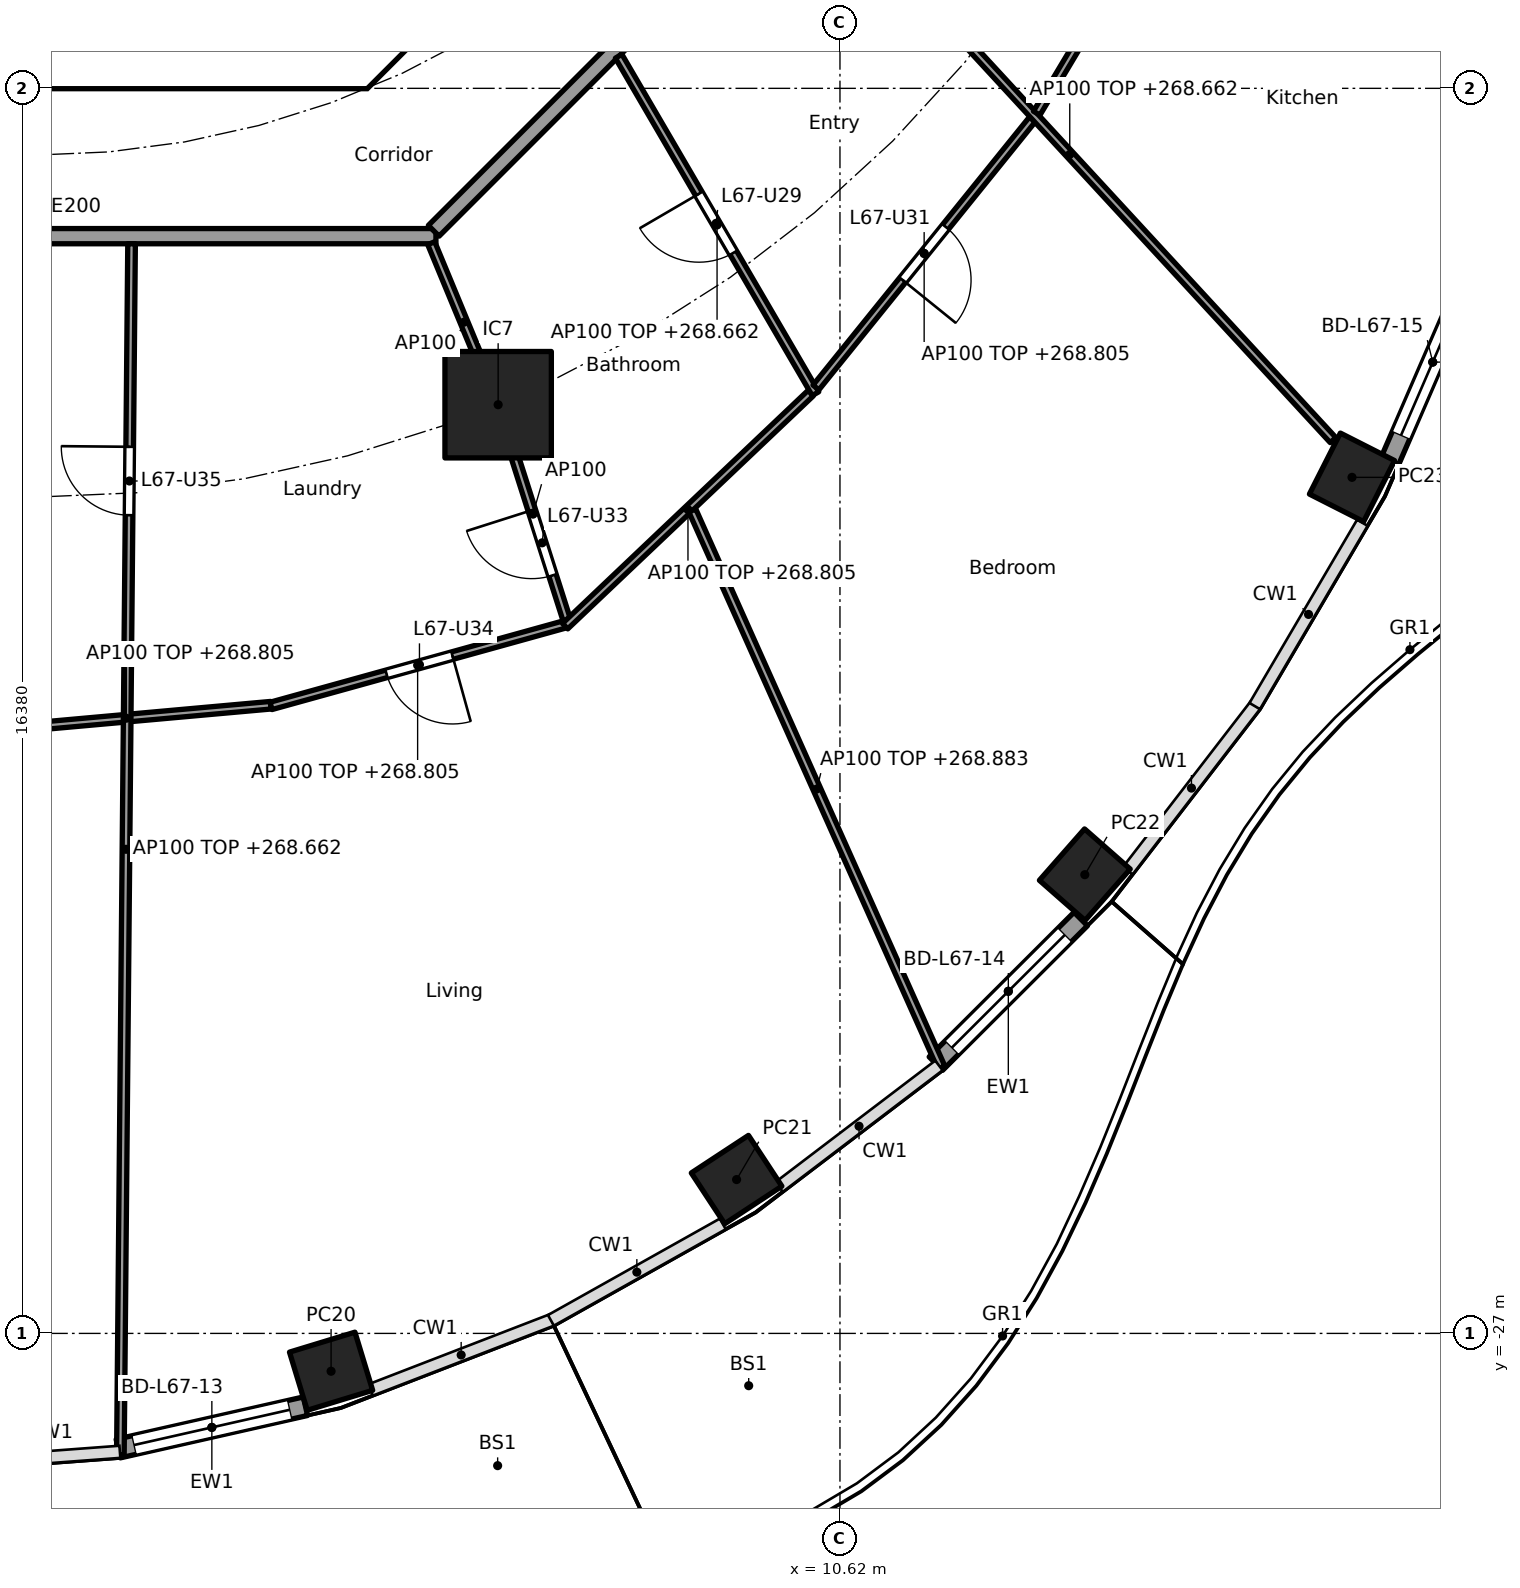
"""IFC4 building model, lengths in metres.
Left out: names, types, materials, properties, quantities, classifications, styles, units other than length and angle.
Written with IfcOpenShell. Run it as: python <this file> out.ifc"""

import sys

from ifc_helpers import new_model, si_unit, direction, frame, frame_2d, origin, origin_2d, place, context, subcontext, project, spatial, polyline, rectangle, hollow_rectangle, outline, extrude, element, fill, save


model = new_model("IFC4")
c1 = context("Model", 3, precision=1e-05, world=origin(), true_north=direction((0.0, 1.0)))
c2 = subcontext(c1, "Body", "Model", "MODEL_VIEW")
j1 = project(units=[si_unit("LENGTHUNIT", "METRE"), si_unit("PLANEANGLEUNIT", "RADIAN")], contexts=[c1])
p1 = place(None, origin())
s1 = spatial("IfcSite", under=j1, at=p1, CompositionType="ELEMENT")
p2 = place(p1, origin())
s2 = spatial("IfcBuilding", under=s1, at=p2, CompositionType="ELEMENT")
p3 = place(p2, frame((0.0, 0.0, 265.9)))
s3 = spatial("IfcBuildingStorey", under=s2, at=p3, CompositionType="ELEMENT", Elevation=265.9)
for number, where, z_axis, x_axis in (
    (1, (3.925, -27.498, 0.0), (0.0, 0.0, 1.0), (0.957, 0.292, 0.0)),
    (2, (9.26, -24.976, 0.0), (0.0, 0.0, 1.0), (0.836, 0.549, 0.0)),
    (3, (13.841, -20.965, 0.0), (0.0, 0.0, 1.0), (0.66, 0.751, 0.0)),
    (4, (17.356, -15.738, 0.0), (0.0, 0.0, 1.0), (0.452, 0.892, 0.0)),
):
    element("IfcColumn", number, at=place(p3, frame(where, z_axis=z_axis, x_axis=x_axis)), inside=s3, PredefinedType="COLUMN", context=c2, shape_type="SweptSolid", body=[
        extrude(hollow_rectangle(XDim=0.9, YDim=0.8, WallThickness=0.028, at=origin_2d()), origin(), (0.0, 0.0, 1.0), 3.7),
    ])
p4 = place(p3, frame((6.123, -14.782, 0.0), z_axis=(0.0, 0.0, 1.0), x_axis=(1.0, 0.0, 0.0)))
e5 = element("IfcColumn", 5, at=p4, inside=s3, PredefinedType="COLUMN", context=c2, shape_type="SweptSolid", body=[
    extrude(rectangle(XDim=1.4, YDim=1.4, at=origin_2d()), origin(), (0.0, 0.0, 1.0), 3.7),
])
p5 = place(p3, frame((3.588, -27.958, 0.0), z_axis=(0.0, 0.0, 1.0), x_axis=(-0.97531487046, -0.22081871175, 0.0)))
e6 = element("IfcWall", 6, at=p5, inside=s3, PredefinedType="SOLIDWALL", context=c2, shape_type="SweptSolid", body=[
    extrude(rectangle(XDim=2.525, YDim=0.25, at=frame_2d((1.263, 0.0))), origin(), (0.0, 0.0, 1.0), 3.44),
])
p6 = place(p5, frame((0.213, 0.0, 0.0)))
e7 = element("IfcOpeningElement", 7, at=p6, cuts=e6, PredefinedType="OPENING", context=c2, shape_type="SweptSolid", body=[
    extrude(rectangle(XDim=2.1, YDim=2.4, at=frame_2d((1.05, 1.2))), frame((0.0, 0.135, 0.0), z_axis=(0.0, -1.0, 0.0), x_axis=(1.0, 0.0, 0.0)), (0.0, 0.0, 1.0), 0.27),
])
p7 = place(p3, frame((13.788, -21.548, 0.0), z_axis=(0.0, 0.0, 1.0), x_axis=(-0.707831739508, -0.706381078841, 0.0)))
e8 = element("IfcWall", 8, at=p7, inside=s3, PredefinedType="SOLIDWALL", context=c2, shape_type="SweptSolid", body=[
    extrude(rectangle(XDim=2.693, YDim=0.25, at=frame_2d((1.346, 0.0))), origin(), (0.0, 0.0, 1.0), 3.44),
])
p8 = place(p7, frame((0.296, 0.0, 0.0)))
e9 = element("IfcOpeningElement", 9, at=p8, cuts=e8, PredefinedType="OPENING", context=c2, shape_type="SweptSolid", body=[
    extrude(rectangle(XDim=2.1, YDim=2.4, at=frame_2d((1.05, 1.2))), frame((0.0, 0.135, 0.0), z_axis=(0.0, -1.0, 0.0), x_axis=(1.0, 0.0, 0.0)), (0.0, 0.0, 1.0), 0.27),
])
p9 = place(p3, frame((18.983, -12.918, 0.0), z_axis=(0.0, 0.0, 1.0), x_axis=(-0.397597791596, -0.9175598052, 0.0)))
e10 = element("IfcWall", 10, at=p9, inside=s3, PredefinedType="SOLIDWALL", context=c2, shape_type="SweptSolid", body=[
    extrude(rectangle(XDim=2.841, YDim=0.25, at=frame_2d((1.42, 0.0))), origin(), (0.0, 0.0, 1.0), 3.44),
])
p10 = place(p9, frame((0.371, 0.0, 0.0)))
e11 = element("IfcOpeningElement", 11, at=p10, cuts=e10, PredefinedType="OPENING", context=c2, shape_type="SweptSolid", body=[
    extrude(rectangle(XDim=2.1, YDim=2.4, at=frame_2d((1.05, 1.2))), frame((0.0, 0.135, 0.0), z_axis=(0.0, -1.0, 0.0), x_axis=(1.0, 0.0, 0.0)), (0.0, 0.0, 1.0), 0.27),
])
p11 = place(p3, frame((4.613, -9.988, 0.0), z_axis=(0.0, 0.0, 1.0), x_axis=(0.707106781187, 0.707106781187, 0.0)))
e12 = element("IfcWall", 12, at=p11, inside=s3, PredefinedType="SHEAR", context=c2, shape_type="SweptSolid", body=[
    extrude(rectangle(XDim=7.602, YDim=0.6, at=frame_2d((3.801, 0.0))), origin(), (0.0, 0.0, 1.0), 3.44),
])
p12 = place(p11, frame((3.201, 0.0, 0.0)))
e13 = element("IfcOpeningElement", 13, at=p12, cuts=e12, PredefinedType="OPENING", context=c2, shape_type="SweptSolid", body=[
    extrude(rectangle(XDim=1.2, YDim=2.1, at=frame_2d((0.6, 1.05))), frame((0.0, 0.31, 0.0), z_axis=(0.0, -1.0, 0.0), x_axis=(1.0, 0.0, 0.0)), (0.0, 0.0, 1.0), 0.62),
])
p13 = place(p3, origin())
e14 = element("IfcWall", 14, at=p13, inside=s3, PredefinedType="SHEAR", context=c2, shape_type="SweptSolid", body=[
    extrude(outline(polyline([(-4.152, -10.025), (4.152, -10.025), (4.401, -9.776), (4.825, -10.2), (4.401, -10.625), (-4.401, -10.625), (-4.825, -10.2), (-4.401, -9.776), (-4.152, -10.025)])), origin(), (0.0, 0.0, 1.0), 3.44),
])
p14 = place(p3, frame((-5.104, -12.565, 0.0), z_axis=(0.0, 0.0, 1.0), x_axis=(1.0, 0.0, 0.0)))
e15 = element("IfcWall", 15, at=p14, inside=s3, PredefinedType="PARTITIONING", context=c2, shape_type="SweptSolid", body=[
    extrude(rectangle(XDim=10.409, YDim=0.2, at=frame_2d((5.205, 0.0))), origin(), (0.0, 0.0, 1.0), 3.44),
])
p15 = place(p3, frame((5.275, -12.494, 0.0), z_axis=(0.0, 0.0, 1.0), x_axis=(0.707106781187, 0.707106781187, 0.0)))
e16 = element("IfcWall", 16, at=p15, inside=s3, PredefinedType="PARTITIONING", context=c2, shape_type="SweptSolid", body=[
    extrude(rectangle(XDim=10.409, YDim=0.2, at=frame_2d((5.205, 0.0))), origin(), (0.0, 0.0, 1.0), 3.44),
])
p16 = place(p15, frame((4.604, 0.0, 0.0)))
e17 = element("IfcOpeningElement", 17, at=p16, cuts=e16, PredefinedType="OPENING", context=c2, shape_type="SweptSolid", body=[
    extrude(rectangle(XDim=1.0, YDim=2.1, at=frame_2d((0.5, 1.05))), frame((0.0, 0.11, 0.0), z_axis=(0.0, -1.0, 0.0), x_axis=(1.0, 0.0, 0.0)), (0.0, 0.0, 1.0), 0.22),
])
p17 = place(p3, frame((-0.67, -19.077, 0.0), z_axis=(0.0, 0.0, 1.0), x_axis=(0.995986472869, 0.089503887414, 0.0)))
e18 = element("IfcWall", 18, at=p17, inside=s3, PredefinedType="PARTITIONING", context=c2, shape_type="SweptSolid", body=[
    extrude(rectangle(XDim=3.819, YDim=0.1, at=frame_2d((1.909, 0.0))), origin(), (0.0, 0.0, 1.0), 2.905),
])
p18 = place(p3, frame((1.3, -12.665, 0.0), z_axis=(0.0, 0.0, 1.0), x_axis=(-0.009254890166, -0.999957172587, 0.0)))
e19 = element("IfcWall", 19, at=p18, inside=s3, PredefinedType="PARTITIONING", context=c2, shape_type="SweptSolid", body=[
    extrude(rectangle(XDim=15.933, YDim=0.1, at=frame_2d((7.967, 0.0))), origin(), (0.0, 0.0, 1.0), 2.762),
])
p19 = place(p18, frame((2.671, 0.0, 0.0)))
e20 = element("IfcOpeningElement", 20, at=p19, cuts=e19, PredefinedType="OPENING", context=c2, shape_type="SweptSolid", body=[
    extrude(rectangle(XDim=0.9, YDim=2.1, at=frame_2d((0.45, 1.05))), frame((0.0, 0.06, 0.0), z_axis=(0.0, -1.0, 0.0), x_axis=(1.0, 0.0, 0.0)), (0.0, 0.0, 1.0), 0.12),
])
p20 = place(p3, frame((3.135, -18.744, 0.0), z_axis=(0.0, 0.0, 1.0), x_axis=(0.963606111552, 0.267326133738, 0.0)))
e21 = element("IfcWall", 21, at=p20, inside=s3, PredefinedType="PARTITIONING", context=c2, shape_type="SweptSolid", body=[
    extrude(rectangle(XDim=4.003, YDim=0.1, at=frame_2d((2.001, 0.0))), origin(), (0.0, 0.0, 1.0), 2.905),
])
p21 = place(p20, frame((1.576, 0.0, 0.0)))
e22 = element("IfcOpeningElement", 22, at=p21, cuts=e21, PredefinedType="OPENING", context=c2, shape_type="SweptSolid", body=[
    extrude(rectangle(XDim=0.9, YDim=2.1, at=frame_2d((0.45, 1.05))), frame((0.0, 0.06, 0.0), z_axis=(0.0, -1.0, 0.0), x_axis=(1.0, 0.0, 0.0)), (0.0, 0.0, 1.0), 0.12),
])
p22 = place(p3, frame((5.243, -12.657, 0.0), z_axis=(0.0, 0.0, 1.0), x_axis=(0.382719158442, -0.923864733477, 0.0)))
e23 = element("IfcWall", 23, at=p22, inside=s3, PredefinedType="PARTITIONING", context=c2, shape_type="SweptSolid", body=[
    extrude(rectangle(XDim=2.25, YDim=0.1, at=frame_2d((1.125, 0.0))), origin(), (0.0, 0.0, 1.0), 3.44),
])
p23 = place(p3, frame((6.138, -14.83, 0.0), z_axis=(0.0, 0.0, 1.0), x_axis=(0.303665801704, -0.952778610631, 0.0)))
e24 = element("IfcWall", 24, at=p23, inside=s3, PredefinedType="PARTITIONING", context=c2, shape_type="SweptSolid", body=[
    extrude(rectangle(XDim=2.922, YDim=0.1, at=frame_2d((1.461, 0.0))), origin(), (0.0, 0.0, 1.0), 3.44),
])
p24 = place(p23, frame((1.407, 0.0, 0.0)))
e25 = element("IfcOpeningElement", 25, at=p24, cuts=e24, PredefinedType="OPENING", context=c2, shape_type="SweptSolid", body=[
    extrude(rectangle(XDim=0.9, YDim=2.1, at=frame_2d((0.45, 1.05))), frame((0.0, 0.06, 0.0), z_axis=(0.0, -1.0, 0.0), x_axis=(1.0, 0.0, 0.0)), (0.0, 0.0, 1.0), 0.12),
])
p25 = place(p3, frame((7.004, -17.695, 0.0), z_axis=(0.0, 0.0, 1.0), x_axis=(0.725438442765, 0.68828705186, 0.0)))
e26 = element("IfcWall", 26, at=p25, inside=s3, PredefinedType="PARTITIONING", context=c2, shape_type="SweptSolid", body=[
    extrude(rectangle(XDim=4.456, YDim=0.1, at=frame_2d((2.228, 0.0))), origin(), (0.0, 0.0, 1.0), 2.905),
])
p26 = place(p3, frame((8.677, -16.173, 0.0), z_axis=(0.0, 0.0, 1.0), x_axis=(0.408174671437, -0.912903849043, 0.0)))
e27 = element("IfcWall", 27, at=p26, inside=s3, PredefinedType="PARTITIONING", context=c2, shape_type="SweptSolid", body=[
    extrude(rectangle(XDim=8.028, YDim=0.1, at=frame_2d((4.014, 0.0))), origin(), (0.0, 0.0, 1.0), 2.983),
])
p27 = place(p3, frame((7.708, -10.198, 0.0), z_axis=(0.0, 0.0, 1.0), x_axis=(0.503838537732, -0.863797851292, 0.0)))
e28 = element("IfcWall", 28, at=p27, inside=s3, PredefinedType="PARTITIONING", context=c2, shape_type="SweptSolid", body=[
    extrude(rectangle(XDim=5.14, YDim=0.1, at=frame_2d((2.57, 0.0))), origin(), (0.0, 0.0, 1.0), 2.762),
])
p28 = place(p27, frame((2.095, 0.0, 0.0)))
e29 = element("IfcOpeningElement", 29, at=p28, cuts=e28, PredefinedType="OPENING", context=c2, shape_type="SweptSolid", body=[
    extrude(rectangle(XDim=0.9, YDim=2.1, at=frame_2d((0.45, 1.05))), frame((0.0, 0.06, 0.0), z_axis=(0.0, -1.0, 0.0), x_axis=(1.0, 0.0, 0.0)), (0.0, 0.0, 1.0), 0.12),
])
p29 = place(p3, frame((10.304, -14.555, 0.0), z_axis=(0.0, 0.0, 1.0), x_axis=(0.628170338674, 0.778075848237, 0.0)))
e30 = element("IfcWall", 30, at=p29, inside=s3, PredefinedType="PARTITIONING", context=c2, shape_type="SweptSolid", body=[
    extrude(rectangle(XDim=4.532, YDim=0.1, at=frame_2d((2.266, 0.0))), origin(), (0.0, 0.0, 1.0), 2.905),
])
p30 = place(p29, frame((1.816, 0.0, 0.0)))
e31 = element("IfcOpeningElement", 31, at=p30, cuts=e30, PredefinedType="OPENING", context=c2, shape_type="SweptSolid", body=[
    extrude(rectangle(XDim=0.9, YDim=2.1, at=frame_2d((0.45, 1.05))), frame((0.0, 0.06, 0.0), z_axis=(0.0, -1.0, 0.0), x_axis=(1.0, 0.0, 0.0)), (0.0, 0.0, 1.0), 0.12),
])
p31 = place(p3, frame((10.179, -7.731, 0.0), z_axis=(0.0, 0.0, 1.0), x_axis=(0.67775318564, -0.73528947997, 0.0)))
e32 = element("IfcWall", 32, at=p31, inside=s3, PredefinedType="PARTITIONING", context=c2, shape_type="SweptSolid", body=[
    extrude(rectangle(XDim=10.222, YDim=0.1, at=frame_2d((5.111, 0.0))), origin(), (0.0, 0.0, 1.0), 2.762),
])
p32 = place(p31, frame((1.766, 0.0, 0.0)))
e33 = element("IfcOpeningElement", 33, at=p32, cuts=e32, PredefinedType="OPENING", context=c2, shape_type="SweptSolid", body=[
    extrude(rectangle(XDim=0.9, YDim=2.1, at=frame_2d((0.45, 1.05))), frame((0.0, 0.06, 0.0), z_axis=(0.0, -1.0, 0.0), x_axis=(1.0, 0.0, 0.0)), (0.0, 0.0, 1.0), 0.12),
])
p33 = place(p3, frame((13.208, -10.947, 0.0), z_axis=(0.0, 0.0, 1.0), x_axis=(0.512726452516, 0.858552028063, 0.0)))
e34 = element("IfcWall", 34, at=p33, inside=s3, PredefinedType="PARTITIONING", context=c2, shape_type="SweptSolid", body=[
    extrude(rectangle(XDim=4.772, YDim=0.1, at=frame_2d((2.386, 0.0))), origin(), (0.0, 0.0, 1.0), 2.905),
])
p34 = place(p33, frame((1.936, 0.0, 0.0)))
e35 = element("IfcOpeningElement", 35, at=p34, cuts=e34, PredefinedType="OPENING", context=c2, shape_type="SweptSolid", body=[
    extrude(rectangle(XDim=0.9, YDim=2.1, at=frame_2d((0.45, 1.05))), frame((0.0, 0.06, 0.0), z_axis=(0.0, -1.0, 0.0), x_axis=(1.0, 0.0, 0.0)), (0.0, 0.0, 1.0), 0.12),
])
p35 = place(p6, origin())
e36 = element("IfcDoor", 36, at=p35, inside=s3, OperationType="SLIDING_TO_LEFT", PredefinedType="DOOR", context=c2, shape_type="SweptSolid", body=[
    extrude(rectangle(XDim=2.1, YDim=2.4, at=frame_2d((1.05, 1.2))), frame((0.0, 0.025, 0.0), z_axis=(0.0, -1.0, 0.0), x_axis=(1.0, 0.0, 0.0)), (0.0, 0.0, 1.0), 0.05),
])
fill(e7, e36)
p36 = place(p8, origin())
e37 = element("IfcDoor", 37, at=p36, inside=s3, OperationType="SLIDING_TO_LEFT", PredefinedType="DOOR", context=c2, shape_type="SweptSolid", body=[
    extrude(rectangle(XDim=2.1, YDim=2.4, at=frame_2d((1.05, 1.2))), frame((0.0, 0.025, 0.0), z_axis=(0.0, -1.0, 0.0), x_axis=(1.0, 0.0, 0.0)), (0.0, 0.0, 1.0), 0.05),
])
fill(e9, e37)
p37 = place(p10, origin())
e38 = element("IfcDoor", 38, at=p37, inside=s3, OperationType="SLIDING_TO_LEFT", PredefinedType="DOOR", context=c2, shape_type="SweptSolid", body=[
    extrude(rectangle(XDim=2.1, YDim=2.4, at=frame_2d((1.05, 1.2))), frame((0.0, 0.025, 0.0), z_axis=(0.0, -1.0, 0.0), x_axis=(1.0, 0.0, 0.0)), (0.0, 0.0, 1.0), 0.05),
])
fill(e11, e38)
p38 = place(p28, frame((0.9, 0.0, 0.0), x_axis=(-1.0, 0.0, 0.0)))
e39 = element("IfcDoor", 39, at=p38, inside=s3, OperationType="SINGLE_SWING_RIGHT", PredefinedType="DOOR", context=c2, shape_type="SweptSolid", body=[
    extrude(rectangle(XDim=0.9, YDim=2.1, at=frame_2d((0.45, 1.05))), frame((0.0, 0.025, 0.0), z_axis=(0.0, -1.0, 0.0), x_axis=(1.0, 0.0, 0.0)), (0.0, 0.0, 1.0), 0.05),
])
fill(e29, e39)
p39 = place(p30, frame((0.9, 0.0, 0.0), x_axis=(-1.0, 0.0, 0.0)))
e40 = element("IfcDoor", 40, at=p39, inside=s3, OperationType="SINGLE_SWING_RIGHT", PredefinedType="DOOR", context=c2, shape_type="SweptSolid", body=[
    extrude(rectangle(XDim=0.9, YDim=2.1, at=frame_2d((0.45, 1.05))), frame((0.0, 0.025, 0.0), z_axis=(0.0, -1.0, 0.0), x_axis=(1.0, 0.0, 0.0)), (0.0, 0.0, 1.0), 0.05),
])
fill(e31, e40)
p40 = place(p24, frame((0.9, 0.0, 0.0), x_axis=(-1.0, 0.0, 0.0)))
e41 = element("IfcDoor", 41, at=p40, inside=s3, OperationType="SINGLE_SWING_RIGHT", PredefinedType="DOOR", context=c2, shape_type="SweptSolid", body=[
    extrude(rectangle(XDim=0.9, YDim=2.1, at=frame_2d((0.45, 1.05))), frame((0.0, 0.025, 0.0), z_axis=(0.0, -1.0, 0.0), x_axis=(1.0, 0.0, 0.0)), (0.0, 0.0, 1.0), 0.05),
])
fill(e25, e41)
p41 = place(p21, frame((0.9, 0.0, 0.0), x_axis=(-1.0, 0.0, 0.0)))
e42 = element("IfcDoor", 42, at=p41, inside=s3, OperationType="SINGLE_SWING_LEFT", PredefinedType="DOOR", context=c2, shape_type="SweptSolid", body=[
    extrude(rectangle(XDim=0.9, YDim=2.1, at=frame_2d((0.45, 1.05))), frame((0.0, 0.025, 0.0), z_axis=(0.0, -1.0, 0.0), x_axis=(1.0, 0.0, 0.0)), (0.0, 0.0, 1.0), 0.05),
])
fill(e22, e42)
p42 = place(p19, frame((0.9, 0.0, 0.0), x_axis=(-1.0, 0.0, 0.0)))
e43 = element("IfcDoor", 43, at=p42, inside=s3, OperationType="SINGLE_SWING_RIGHT", PredefinedType="DOOR", context=c2, shape_type="SweptSolid", body=[
    extrude(rectangle(XDim=0.9, YDim=2.1, at=frame_2d((0.45, 1.05))), frame((0.0, 0.025, 0.0), z_axis=(0.0, -1.0, 0.0), x_axis=(1.0, 0.0, 0.0)), (0.0, 0.0, 1.0), 0.05),
])
fill(e20, e43)
save(model, sys.argv[1])
